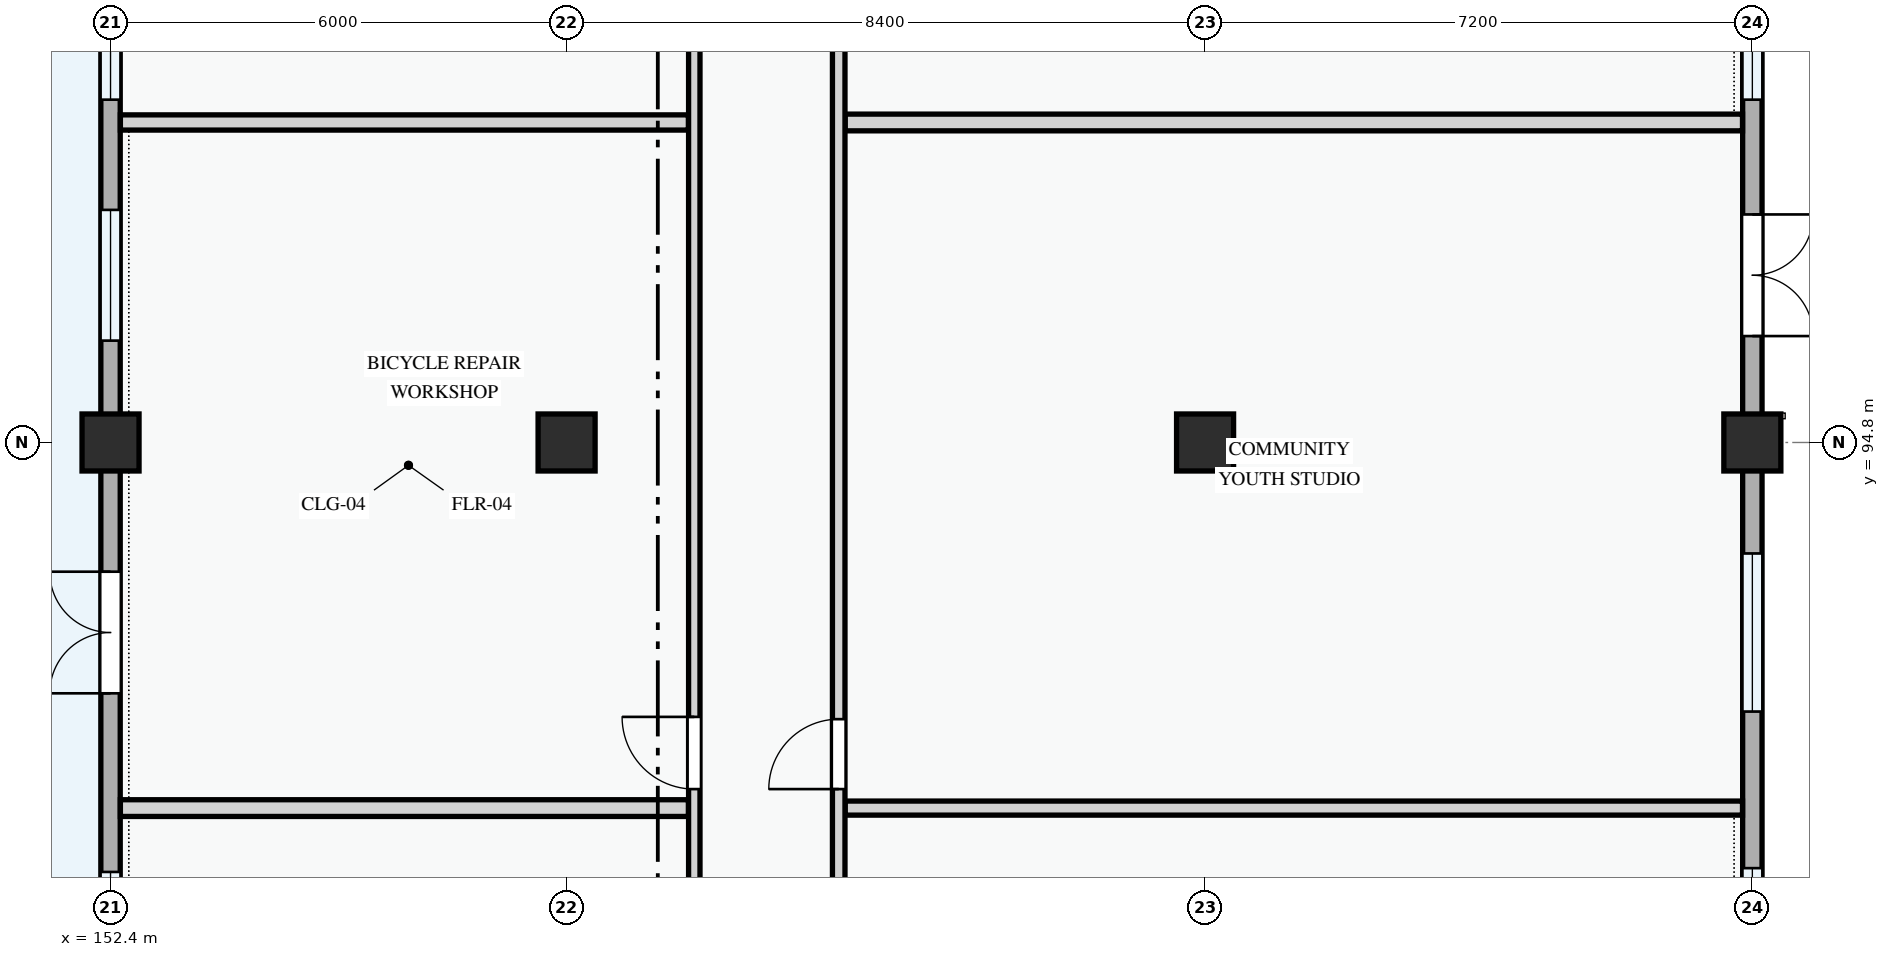
"""IFC4 building model, lengths in metres.
Left out: names, types, materials, properties, quantities, classifications, styles, units other than length and angle.
Written with IfcOpenShell. Run it as: python <this file> out.ifc"""

import sys

from ifc_helpers import new_model, si_unit, direction, frame, frame_2d, origin, origin_2d, place, context, subcontext, project, spatial, rectangle, extrude, element, fill, save


model = new_model("IFC4")
c1 = context("Model", 3, precision=1e-05, world=origin(), true_north=direction((0.0, 1.0)))
c2 = subcontext(c1, "Body", "Model", "MODEL_VIEW")
j1 = project(units=[si_unit("LENGTHUNIT", "METRE"), si_unit("PLANEANGLEUNIT", "RADIAN")], contexts=[c1])
p1 = place(None, origin())
s1 = spatial("IfcSite", under=j1, at=p1, CompositionType="ELEMENT")
p2 = place(p1, origin())
s2 = spatial("IfcBuilding", under=s1, at=p2, CompositionType="ELEMENT")
p3 = place(p2, origin())
s3 = spatial("IfcBuildingStorey", under=s2, at=p3, CompositionType="ELEMENT", Elevation=0.0)
for number, where, z_axis, x_axis in (
    (1, (152.4, 94.8, 0.0), (0.0, 0.0, 1.0), (1.0, 0.0, 0.0)),
    (2, (158.4, 94.8, 0.0), (0.0, 0.0, 1.0), (1.0, 0.0, 0.0)),
    (3, (166.8, 94.8, 0.0), (0.0, 0.0, 1.0), (1.0, 0.0, 0.0)),
    (4, (174.0, 94.8, 0.0), (0.0, 0.0, 1.0), (1.0, 0.0, 0.0)),
):
    element("IfcColumn", number, at=place(p3, frame(where, z_axis=z_axis, x_axis=x_axis)), inside=s3, PredefinedType="COLUMN", context=c2, shape_type="SweptSolid", body=[
        extrude(rectangle(XDim=0.75, YDim=0.75, at=origin_2d()), origin(), (0.0, 0.0, 1.0), 4.5),
    ])
p4 = place(p3, frame((152.4, 100.8, 0.0), z_axis=(0.0, 0.0, 1.0), x_axis=(0.0, -1.0, 0.0)))
e5 = element("IfcWall", 5, at=p4, inside=s3, PredefinedType="STANDARD", context=c2, shape_type="SweptSolid", body=[
    extrude(rectangle(XDim=6.0, YDim=0.255, at=frame_2d((3.0, 0.0))), origin(), (0.0, 0.0, 1.0), 3.585),
])
p5 = place(p4, frame((0.49, 0.0, 0.78)))
e6 = element("IfcOpeningElement", 6, at=p5, cuts=e5, PredefinedType="OPENING", context=c2, shape_type="SweptSolid", body=[
    extrude(rectangle(XDim=1.0, YDim=1.25, at=frame_2d((0.5, 0.625))), frame((0.0, 0.137, 0.0), z_axis=(0.0, -1.0, 0.0), x_axis=(1.0, 0.0, 0.0)), (0.0, 0.0, 1.0), 0.275),
])
p6 = place(p4, frame((2.94, 0.0, 0.78)))
e7 = element("IfcOpeningElement", 7, at=p6, cuts=e5, PredefinedType="OPENING", context=c2, shape_type="SweptSolid", body=[
    extrude(rectangle(XDim=1.72, YDim=1.52, at=frame_2d((0.86, 0.76))), frame((0.0, 0.137, 0.0), z_axis=(0.0, -1.0, 0.0), x_axis=(1.0, 0.0, 0.0)), (0.0, 0.0, 1.0), 0.275),
])
p7 = place(p3, frame((152.4, 94.8, 0.0), z_axis=(0.0, 0.0, 1.0), x_axis=(0.0, -1.0, 0.0)))
e8 = element("IfcWall", 8, at=p7, inside=s3, PredefinedType="STANDARD", context=c2, shape_type="SweptSolid", body=[
    extrude(rectangle(XDim=8.4, YDim=0.255, at=frame_2d((4.2, 0.0))), origin(), (0.0, 0.0, 1.0), 3.485),
])
p8 = place(p7, frame((1.7, 0.0, 0.0)))
e9 = element("IfcOpeningElement", 9, at=p8, cuts=e8, PredefinedType="OPENING", context=c2, shape_type="SweptSolid", body=[
    extrude(rectangle(XDim=1.6, YDim=2.35, at=frame_2d((0.8, 1.175))), frame((0.0, 0.137, 0.0), z_axis=(0.0, -1.0, 0.0), x_axis=(1.0, 0.0, 0.0)), (0.0, 0.0, 1.0), 0.275),
])
p9 = place(p7, frame((5.65, 0.0, 0.78)))
e10 = element("IfcOpeningElement", 10, at=p9, cuts=e8, PredefinedType="OPENING", context=c2, shape_type="SweptSolid", body=[
    extrude(rectangle(XDim=1.72, YDim=1.52, at=frame_2d((0.86, 0.76))), frame((0.0, 0.137, 0.0), z_axis=(0.0, -1.0, 0.0), x_axis=(1.0, 0.0, 0.0)), (0.0, 0.0, 1.0), 0.275),
])
p10 = place(p3, frame((174.0, 86.4, 0.0), z_axis=(0.0, 0.0, 1.0), x_axis=(0.0, 1.0, 0.0)))
e11 = element("IfcWall", 11, at=p10, inside=s3, PredefinedType="STANDARD", context=c2, shape_type="SweptSolid", body=[
    extrude(rectangle(XDim=8.4, YDim=0.255, at=frame_2d((4.2, 0.0))), origin(), (0.0, 0.0, 1.0), 3.485),
])
p11 = place(p10, frame((0.98, 0.0, 0.78)))
e12 = element("IfcOpeningElement", 12, at=p11, cuts=e11, PredefinedType="OPENING", context=c2, shape_type="SweptSolid", body=[
    extrude(rectangle(XDim=1.82, YDim=1.46, at=frame_2d((0.91, 0.73))), frame((0.0, 0.137, 0.0), z_axis=(0.0, -1.0, 0.0), x_axis=(1.0, 0.0, 0.0)), (0.0, 0.0, 1.0), 0.275),
])
p12 = place(p10, frame((4.86, 0.0, 0.78)))
e13 = element("IfcOpeningElement", 13, at=p12, cuts=e11, PredefinedType="OPENING", context=c2, shape_type="SweptSolid", body=[
    extrude(rectangle(XDim=2.08, YDim=1.52, at=frame_2d((1.04, 0.76))), frame((0.0, 0.137, 0.0), z_axis=(0.0, -1.0, 0.0), x_axis=(1.0, 0.0, 0.0)), (0.0, 0.0, 1.0), 0.275),
])
p13 = place(p3, frame((174.0, 94.8, 0.0), z_axis=(0.0, 0.0, 1.0), x_axis=(0.0, 1.0, 0.0)))
e14 = element("IfcWall", 14, at=p13, inside=s3, PredefinedType="STANDARD", context=c2, shape_type="SweptSolid", body=[
    extrude(rectangle(XDim=6.0, YDim=0.255, at=frame_2d((3.0, 0.0))), origin(), (0.0, 0.0, 1.0), 3.585),
])
p14 = place(p13, frame((1.4, 0.0, 0.0)))
e15 = element("IfcOpeningElement", 15, at=p14, cuts=e14, PredefinedType="OPENING", context=c2, shape_type="SweptSolid", body=[
    extrude(rectangle(XDim=1.6, YDim=2.35, at=frame_2d((0.8, 1.175))), frame((0.0, 0.137, 0.0), z_axis=(0.0, -1.0, 0.0), x_axis=(1.0, 0.0, 0.0)), (0.0, 0.0, 1.0), 0.275),
])
p15 = place(p13, frame((4.51, 0.0, 0.78)))
e16 = element("IfcOpeningElement", 16, at=p15, cuts=e14, PredefinedType="OPENING", context=c2, shape_type="SweptSolid", body=[
    extrude(rectangle(XDim=1.0, YDim=1.25, at=frame_2d((0.5, 0.625))), frame((0.0, 0.137, 0.0), z_axis=(0.0, -1.0, 0.0), x_axis=(1.0, 0.0, 0.0)), (0.0, 0.0, 1.0), 0.275),
])
p16 = place(p3, frame((152.53, 89.99, 0.0), z_axis=(0.0, 0.0, 1.0), x_axis=(1.0, 0.0, 0.0)))
e17 = element("IfcWall", 17, at=p16, inside=s3, PredefinedType="PARTITIONING", context=c2, shape_type="SweptSolid", body=[
    extrude(rectangle(XDim=7.473, YDim=0.22, at=frame_2d((3.737, 0.0))), origin(), (0.0, 0.0, 1.0), 4.2),
])
p17 = place(p3, frame((162.064, 89.99, 0.0), z_axis=(0.0, 0.0, 1.0), x_axis=(1.0, 0.0, 0.0)))
e18 = element("IfcWall", 18, at=p17, inside=s3, PredefinedType="PARTITIONING", context=c2, shape_type="SweptSolid", body=[
    extrude(rectangle(XDim=11.806, YDim=0.185, at=frame_2d((5.903, 0.0))), origin(), (0.0, 0.0, 1.0), 4.2),
])
p18 = place(p3, frame((152.53, 99.01, 0.0), z_axis=(0.0, 0.0, 1.0), x_axis=(1.0, 0.0, 0.0)))
e19 = element("IfcWall", 19, at=p18, inside=s3, PredefinedType="PARTITIONING", context=c2, shape_type="SweptSolid", body=[
    extrude(rectangle(XDim=7.473, YDim=0.2, at=frame_2d((3.737, 0.0))), origin(), (0.0, 0.0, 1.0), 4.2),
])
p19 = place(p3, frame((162.064, 99.01, 0.0), z_axis=(0.0, 0.0, 1.0), x_axis=(1.0, 0.0, 0.0)))
e20 = element("IfcWall", 20, at=p19, inside=s3, PredefinedType="PARTITIONING", context=c2, shape_type="SweptSolid", body=[
    extrude(rectangle(XDim=11.806, YDim=0.22, at=frame_2d((5.903, 0.0))), origin(), (0.0, 0.0, 1.0), 4.2),
])
p20 = place(p3, frame((160.08, 80.53, 0.0), z_axis=(0.0, 0.0, 1.0), x_axis=(0.0, 1.0, 0.0)))
e21 = element("IfcWall", 21, at=p20, inside=s3, PredefinedType="PARTITIONING", context=c2, shape_type="SweptSolid", body=[
    extrude(rectangle(XDim=28.811, YDim=0.15, at=frame_2d((14.405, 0.0))), origin(), (0.0, 0.0, 1.0), 4.2),
])
p21 = place(p20, frame((2.453, 0.0, 0.0)))
e22 = element("IfcOpeningElement", 22, at=p21, cuts=e21, PredefinedType="OPENING", context=c2, shape_type="SweptSolid", body=[
    extrude(rectangle(XDim=0.95, YDim=2.1, at=frame_2d((0.475, 1.05))), frame((0.0, 0.085, 0.0), z_axis=(0.0, -1.0, 0.0), x_axis=(1.0, 0.0, 0.0)), (0.0, 0.0, 1.0), 0.17),
])
p22 = place(p20, frame((9.71, 0.0, 0.0)))
e23 = element("IfcOpeningElement", 23, at=p22, cuts=e21, PredefinedType="OPENING", context=c2, shape_type="SweptSolid", body=[
    extrude(rectangle(XDim=0.95, YDim=2.1, at=frame_2d((0.475, 1.05))), frame((0.0, 0.085, 0.0), z_axis=(0.0, -1.0, 0.0), x_axis=(1.0, 0.0, 0.0)), (0.0, 0.0, 1.0), 0.17),
])
p23 = place(p20, frame((24.003, 0.0, 0.0)))
e24 = element("IfcOpeningElement", 24, at=p23, cuts=e21, PredefinedType="OPENING", context=c2, shape_type="SweptSolid", body=[
    extrude(rectangle(XDim=0.95, YDim=2.1, at=frame_2d((0.475, 1.05))), frame((0.0, 0.085, 0.0), z_axis=(0.0, -1.0, 0.0), x_axis=(1.0, 0.0, 0.0)), (0.0, 0.0, 1.0), 0.17),
])
p24 = place(p3, frame((161.98, 80.53, 0.0), z_axis=(0.0, 0.0, 1.0), x_axis=(0.0, 1.0, 0.0)))
e25 = element("IfcWall", 25, at=p24, inside=s3, PredefinedType="PARTITIONING", context=c2, shape_type="SweptSolid", body=[
    extrude(rectangle(XDim=28.811, YDim=0.165, at=frame_2d((14.405, 0.0))), origin(), (0.0, 0.0, 1.0), 4.2),
])
p25 = place(p24, frame((2.45, 0.0, 0.0)))
e26 = element("IfcOpeningElement", 26, at=p25, cuts=e25, PredefinedType="OPENING", context=c2, shape_type="SweptSolid", body=[
    extrude(rectangle(XDim=0.92, YDim=2.1, at=frame_2d((0.46, 1.05))), frame((0.0, 0.093, 0.0), z_axis=(0.0, -1.0, 0.0), x_axis=(1.0, 0.0, 0.0)), (0.0, 0.0, 1.0), 0.185),
])
p26 = place(p24, frame((9.71, 0.0, 0.0)))
e27 = element("IfcOpeningElement", 27, at=p26, cuts=e25, PredefinedType="OPENING", context=c2, shape_type="SweptSolid", body=[
    extrude(rectangle(XDim=0.92, YDim=2.1, at=frame_2d((0.46, 1.05))), frame((0.0, 0.093, 0.0), z_axis=(0.0, -1.0, 0.0), x_axis=(1.0, 0.0, 0.0)), (0.0, 0.0, 1.0), 0.185),
])
p27 = place(p24, frame((23.997, 0.0, 0.0)))
e28 = element("IfcOpeningElement", 28, at=p27, cuts=e25, PredefinedType="OPENING", context=c2, shape_type="SweptSolid", body=[
    extrude(rectangle(XDim=0.92, YDim=2.1, at=frame_2d((0.46, 1.05))), frame((0.0, 0.093, 0.0), z_axis=(0.0, -1.0, 0.0), x_axis=(1.0, 0.0, 0.0)), (0.0, 0.0, 1.0), 0.185),
])
p28 = place(p5, origin())
e29 = element("IfcWindow", 29, at=p28, inside=s3, PartitioningType="SINGLE_PANEL", PredefinedType="WINDOW", context=c2, shape_type="SweptSolid", body=[
    extrude(rectangle(XDim=1.0, YDim=1.25, at=frame_2d((0.5, 0.625))), frame((0.0, 0.03, 0.0), z_axis=(0.0, -1.0, 0.0), x_axis=(1.0, 0.0, 0.0)), (0.0, 0.0, 1.0), 0.06),
])
fill(e6, e29)
p29 = place(p6, origin())
e30 = element("IfcWindow", 30, at=p29, inside=s3, PartitioningType="DOUBLE_PANEL_VERTICAL", PredefinedType="WINDOW", context=c2, shape_type="SweptSolid", body=[
    extrude(rectangle(XDim=1.72, YDim=1.52, at=frame_2d((0.86, 0.76))), frame((0.0, 0.03, 0.0), z_axis=(0.0, -1.0, 0.0), x_axis=(1.0, 0.0, 0.0)), (0.0, 0.0, 1.0), 0.06),
])
fill(e7, e30)
p30 = place(p8, frame((1.6, 0.0, 0.0), z_axis=(0.0, 0.0, 1.0), x_axis=(-1.0, 0.0, 0.0)))
e31 = element("IfcDoor", 31, at=p30, inside=s3, OperationType="DOUBLE_DOOR_SINGLE_SWING", PredefinedType="DOOR", context=c2, shape_type="SweptSolid", body=[
    extrude(rectangle(XDim=1.6, YDim=2.35, at=frame_2d((0.8, 1.175))), frame((0.0, 0.025, 0.0), z_axis=(0.0, -1.0, 0.0), x_axis=(1.0, 0.0, 0.0)), (0.0, 0.0, 1.0), 0.05),
])
fill(e9, e31)
p31 = place(p9, origin())
e32 = element("IfcWindow", 32, at=p31, inside=s3, PartitioningType="DOUBLE_PANEL_VERTICAL", PredefinedType="WINDOW", context=c2, shape_type="SweptSolid", body=[
    extrude(rectangle(XDim=1.72, YDim=1.52, at=frame_2d((0.86, 0.76))), frame((0.0, 0.03, 0.0), z_axis=(0.0, -1.0, 0.0), x_axis=(1.0, 0.0, 0.0)), (0.0, 0.0, 1.0), 0.06),
])
fill(e10, e32)
p32 = place(p11, origin())
e33 = element("IfcWindow", 33, at=p32, inside=s3, PartitioningType="DOUBLE_PANEL_VERTICAL", PredefinedType="WINDOW", context=c2, shape_type="SweptSolid", body=[
    extrude(rectangle(XDim=1.82, YDim=1.46, at=frame_2d((0.91, 0.73))), frame((0.0, 0.03, 0.0), z_axis=(0.0, -1.0, 0.0), x_axis=(1.0, 0.0, 0.0)), (0.0, 0.0, 1.0), 0.06),
])
fill(e12, e33)
p33 = place(p12, origin())
e34 = element("IfcWindow", 34, at=p33, inside=s3, PartitioningType="DOUBLE_PANEL_VERTICAL", PredefinedType="WINDOW", context=c2, shape_type="SweptSolid", body=[
    extrude(rectangle(XDim=2.08, YDim=1.52, at=frame_2d((1.04, 0.76))), frame((0.0, 0.03, 0.0), z_axis=(0.0, -1.0, 0.0), x_axis=(1.0, 0.0, 0.0)), (0.0, 0.0, 1.0), 0.06),
])
fill(e13, e34)
p34 = place(p14, frame((1.6, 0.0, 0.0), z_axis=(0.0, 0.0, 1.0), x_axis=(-1.0, 0.0, 0.0)))
e35 = element("IfcDoor", 35, at=p34, inside=s3, OperationType="DOUBLE_DOOR_SINGLE_SWING", PredefinedType="DOOR", context=c2, shape_type="SweptSolid", body=[
    extrude(rectangle(XDim=1.6, YDim=2.35, at=frame_2d((0.8, 1.175))), frame((0.0, 0.025, 0.0), z_axis=(0.0, -1.0, 0.0), x_axis=(1.0, 0.0, 0.0)), (0.0, 0.0, 1.0), 0.05),
])
fill(e15, e35)
p35 = place(p15, origin())
e36 = element("IfcWindow", 36, at=p35, inside=s3, PartitioningType="SINGLE_PANEL", PredefinedType="WINDOW", context=c2, shape_type="SweptSolid", body=[
    extrude(rectangle(XDim=1.0, YDim=1.25, at=frame_2d((0.5, 0.625))), frame((0.0, 0.03, 0.0), z_axis=(0.0, -1.0, 0.0), x_axis=(1.0, 0.0, 0.0)), (0.0, 0.0, 1.0), 0.06),
])
fill(e16, e36)
p36 = place(p22, origin())
e37 = element("IfcDoor", 37, at=p36, inside=s3, OperationType="SINGLE_SWING_RIGHT", PredefinedType="DOOR", context=c2, shape_type="SweptSolid", body=[
    extrude(rectangle(XDim=0.95, YDim=2.1, at=frame_2d((0.475, 1.05))), frame((0.0, 0.025, 0.0), z_axis=(0.0, -1.0, 0.0), x_axis=(1.0, 0.0, 0.0)), (0.0, 0.0, 1.0), 0.05),
])
fill(e23, e37)
p37 = place(p26, origin())
e38 = element("IfcDoor", 38, at=p37, inside=s3, OperationType="SINGLE_SWING_LEFT", PredefinedType="DOOR", context=c2, shape_type="SweptSolid", body=[
    extrude(rectangle(XDim=0.92, YDim=2.1, at=frame_2d((0.46, 1.05))), frame((0.0, 0.025, 0.0), z_axis=(0.0, -1.0, 0.0), x_axis=(1.0, 0.0, 0.0)), (0.0, 0.0, 1.0), 0.05),
])
fill(e27, e38)
save(model, sys.argv[1])
